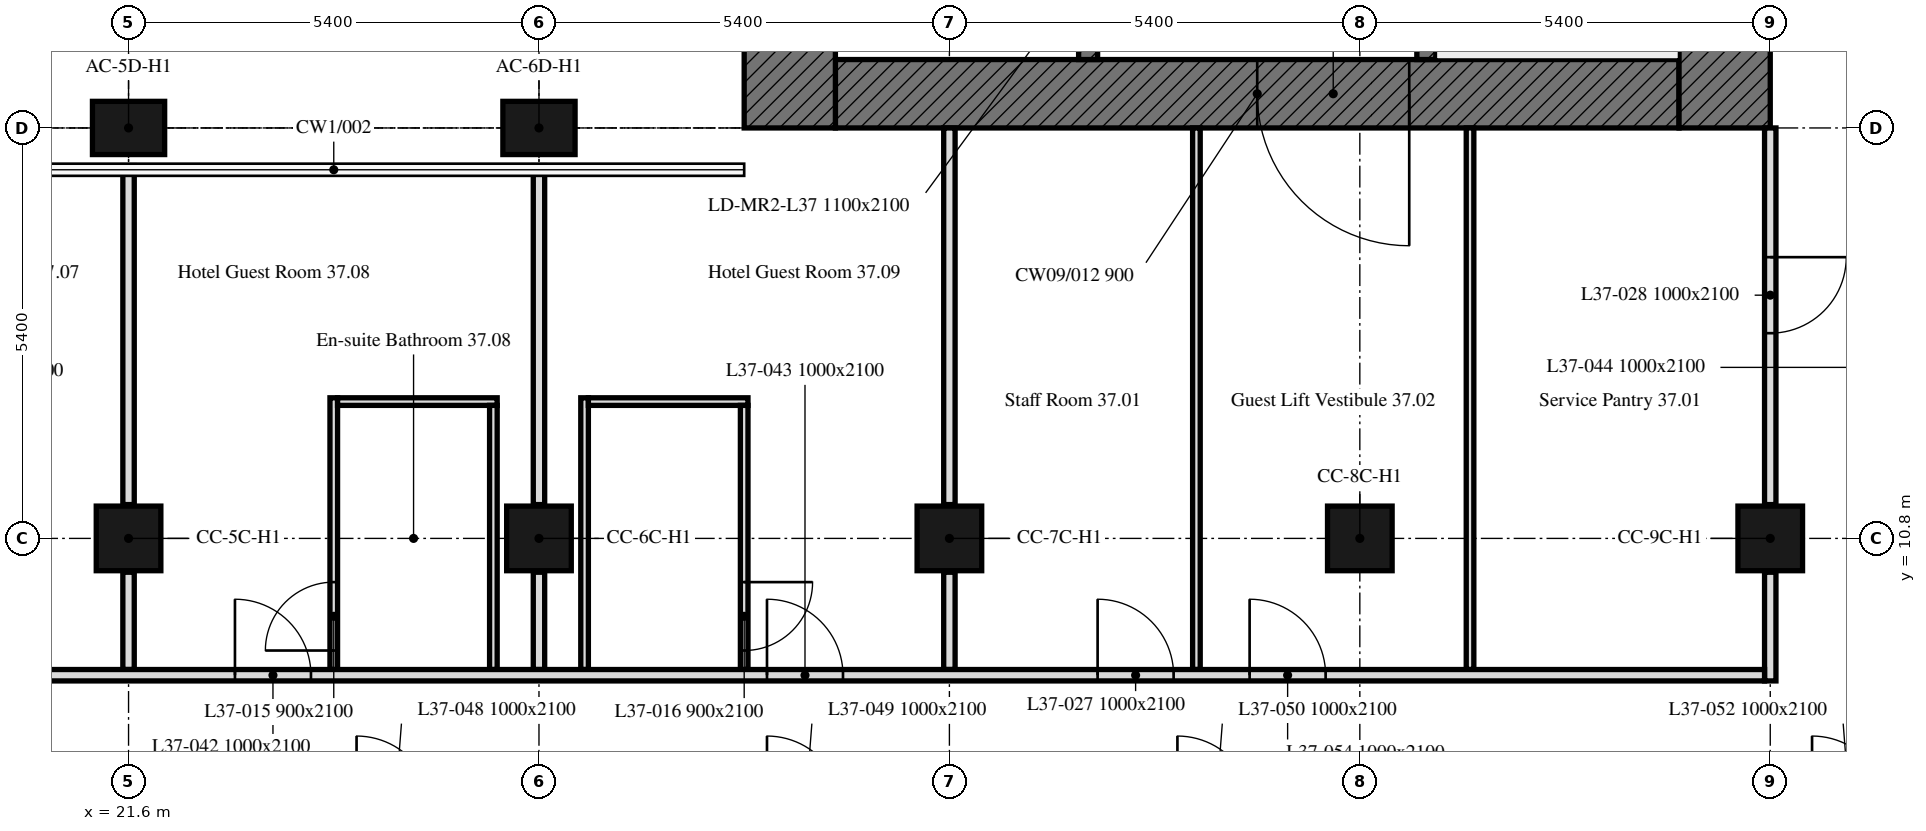
"""IFC4 building model, lengths in metres.
Left out: names, types, materials, properties, quantities, classifications, styles, units other than length and angle.
Written with IfcOpenShell. Run it as: python <this file> out.ifc"""

import sys

from ifc_helpers import new_model, si_unit, direction, frame, frame_2d, origin, origin_2d, place, context, subcontext, project, spatial, rectangle, extrude, element, fill, save


model = new_model("IFC4")
c1 = context("Model", 3, precision=1e-05, world=origin(), true_north=direction((0.0, 1.0)))
c2 = subcontext(c1, "Body", "Model", "MODEL_VIEW")
j1 = project(units=[si_unit("LENGTHUNIT", "METRE"), si_unit("PLANEANGLEUNIT", "RADIAN")], contexts=[c1])
p1 = place(None, origin())
s1 = spatial("IfcSite", under=j1, at=p1, CompositionType="ELEMENT")
p2 = place(p1, origin())
s2 = spatial("IfcBuilding", under=s1, at=p2, CompositionType="ELEMENT")
p3 = place(p2, frame((0.0, 0.0, 159.4)))
s3 = spatial("IfcBuildingStorey", under=s2, at=p3, CompositionType="ELEMENT", Elevation=159.4)
for number, where, z_axis, x_axis in (
    (1, (21.6, 10.8, 0.0), (0.0, 0.0, 1.0), (1.0, 0.0, 0.0)),
    (2, (27.0, 10.8, 0.0), (0.0, 0.0, 1.0), (1.0, 0.0, 0.0)),
    (3, (32.4, 10.8, 0.0), (0.0, 0.0, 1.0), (1.0, 0.0, 0.0)),
    (4, (37.8, 10.8, 0.0), (0.0, 0.0, 1.0), (1.0, 0.0, 0.0)),
    (5, (43.2, 10.8, 0.0), (0.0, 0.0, 1.0), (1.0, 0.0, 0.0)),
):
    element("IfcColumn", number, at=place(p3, frame(where, z_axis=z_axis, x_axis=x_axis)), inside=s3, PredefinedType="COLUMN", context=c2, shape_type="SweptSolid", body=[
        extrude(rectangle(XDim=0.85, YDim=0.85, at=origin_2d()), origin(), (0.0, 0.0, 1.0), 3.0),
    ])
for number, where, z_axis, x_axis in (
    (6, (21.6, 16.2, 0.0), (0.0, 0.0, 1.0), (1.0, 0.0, 0.0)),
    (7, (27.0, 16.2, 0.0), (0.0, 0.0, 1.0), (1.0, 0.0, 0.0)),
):
    element("IfcColumn", number, at=place(p3, frame(where, z_axis=z_axis, x_axis=x_axis)), inside=s3, PredefinedType="COLUMN", context=c2, shape_type="SweptSolid", body=[
        extrude(rectangle(XDim=0.95, YDim=0.7, at=origin_2d()), origin(), (0.0, 0.0, 1.0), 3.0),
    ])
p4 = place(p3, frame((42.0, 16.65, 0.0), z_axis=(0.0, 0.0, 1.0), x_axis=(-1.0, 0.0, 0.0)))
e8 = element("IfcWall", 8, at=p4, inside=s3, PredefinedType="SOLIDWALL", context=c2, shape_type="SweptSolid", body=[
    extrude(rectangle(XDim=11.1, YDim=0.9, at=frame_2d((5.55, 0.0))), origin(), (0.0, 0.0, 1.0), 3.0),
])
p5 = place(p4, frame((3.55, 0.0, 0.0)))
e9 = element("IfcOpeningElement", 9, at=p5, cuts=e8, PredefinedType="OPENING", context=c2, shape_type="SweptSolid", body=[
    extrude(rectangle(XDim=2.0, YDim=2.4, at=frame_2d((1.0, 1.2))), frame((0.0, 0.45, 0.0), z_axis=(0.0, -1.0, 0.0), x_axis=(1.0, 0.0, 0.0)), (0.0, 0.0, 1.0), 0.9),
])
for number, where, z_axis, x_axis in (
    (10, (42.6, 32.4, 0.0), (0.0, 0.0, 1.0), (0.0, -1.0, 0.0)),
    (11, (30.3, 16.2, 0.0), (0.0, 0.0, 1.0), (0.0, 1.0, 0.0)),
):
    element("IfcWall", number, at=place(p3, frame(where, z_axis=z_axis, x_axis=x_axis)), inside=s3, PredefinedType="SOLIDWALL", context=c2, shape_type="SweptSolid", body=[
        extrude(rectangle(XDim=16.2, YDim=1.2, at=frame_2d((8.1, 0.0))), origin(), (0.0, 0.0, 1.0), 3.0),
    ])
p6 = place(p3, frame((38.675, 17.1, 0.0), z_axis=(0.0, 0.0, 1.0), x_axis=(0.0, 1.0, 0.0)))
e12 = element("IfcWall", 12, at=p6, inside=s3, PredefinedType="SOLIDWALL", context=c2, shape_type="SweptSolid", body=[
    extrude(rectangle(XDim=14.4, YDim=0.25, at=frame_2d((7.2, 0.0))), origin(), (0.0, 0.0, 1.0), 3.0),
])
p7 = place(p6, frame((4.6, 0.0, 0.0)))
e13 = element("IfcOpeningElement", 13, at=p7, cuts=e12, PredefinedType="OPENING", context=c2, shape_type="SweptSolid", body=[
    extrude(rectangle(XDim=1.0, YDim=2.1, at=frame_2d((0.5, 1.05))), frame((0.0, 0.125, 0.0), z_axis=(0.0, -1.0, 0.0), x_axis=(1.0, 0.0, 0.0)), (0.0, 0.0, 1.0), 0.25),
])
p8 = place(p6, frame((7.062, 0.0, 0.0)))
e14 = element("IfcOpeningElement", 14, at=p8, cuts=e12, PredefinedType="OPENING", context=c2, shape_type="SweptSolid", body=[
    extrude(rectangle(XDim=1.2, YDim=2.1, at=frame_2d((0.6, 1.05))), frame((0.0, 0.125, 0.0), z_axis=(0.0, -1.0, 0.0), x_axis=(1.0, 0.0, 0.0)), (0.0, 0.0, 1.0), 0.25),
])
p9 = place(p6, frame((9.599, 0.0, 0.0)))
e15 = element("IfcOpeningElement", 15, at=p9, cuts=e12, PredefinedType="OPENING", context=c2, shape_type="SweptSolid", body=[
    extrude(rectangle(XDim=0.9, YDim=2.1, at=frame_2d((0.45, 1.05))), frame((0.0, 0.125, 0.0), z_axis=(0.0, -1.0, 0.0), x_axis=(1.0, 0.0, 0.0)), (0.0, 0.0, 1.0), 0.25),
])
p10 = place(p6, frame((11.032, 0.0, 0.0)))
e16 = element("IfcOpeningElement", 16, at=p10, cuts=e12, PredefinedType="OPENING", context=c2, shape_type="SweptSolid", body=[
    extrude(rectangle(XDim=0.9, YDim=2.1, at=frame_2d((0.45, 1.05))), frame((0.0, 0.125, 0.0), z_axis=(0.0, -1.0, 0.0), x_axis=(1.0, 0.0, 0.0)), (0.0, 0.0, 1.0), 0.25),
])
p11 = place(p6, frame((12.846, 0.0, 0.0)))
e17 = element("IfcOpeningElement", 17, at=p11, cuts=e12, PredefinedType="OPENING", context=c2, shape_type="SweptSolid", body=[
    extrude(rectangle(XDim=0.9, YDim=2.1, at=frame_2d((0.45, 1.05))), frame((0.0, 0.125, 0.0), z_axis=(0.0, -1.0, 0.0), x_axis=(1.0, 0.0, 0.0)), (0.0, 0.0, 1.0), 0.25),
])
p12 = place(p3, frame((34.225, 17.1, 0.0), z_axis=(0.0, 0.0, 1.0), x_axis=(0.0, 1.0, 0.0)))
e18 = element("IfcWall", 18, at=p12, inside=s3, PredefinedType="SOLIDWALL", context=c2, shape_type="SweptSolid", body=[
    extrude(rectangle(XDim=14.4, YDim=0.25, at=frame_2d((7.2, 0.0))), origin(), (0.0, 0.0, 1.0), 3.0),
])
p13 = place(p12, frame((13.15, 0.0, 0.0)))
e19 = element("IfcOpeningElement", 19, at=p13, cuts=e18, PredefinedType="OPENING", context=c2, shape_type="SweptSolid", body=[
    extrude(rectangle(XDim=1.0, YDim=2.1, at=frame_2d((0.5, 1.05))), frame((0.0, 0.125, 0.0), z_axis=(0.0, -1.0, 0.0), x_axis=(1.0, 0.0, 0.0)), (0.0, 0.0, 1.0), 0.25),
])
p14 = place(p12, frame((0.6, 0.0, 0.0)))
e20 = element("IfcOpeningElement", 20, at=p14, cuts=e18, PredefinedType="OPENING", context=c2, shape_type="SweptSolid", body=[
    extrude(rectangle(XDim=1.1, YDim=2.1, at=frame_2d((0.55, 1.05))), frame((0.0, 0.125, 0.0), z_axis=(0.0, -1.0, 0.0), x_axis=(1.0, 0.0, 0.0)), (0.0, 0.0, 1.0), 0.25),
])
p15 = place(p12, frame((3.25, 0.0, 0.0)))
e21 = element("IfcOpeningElement", 21, at=p15, cuts=e18, PredefinedType="OPENING", context=c2, shape_type="SweptSolid", body=[
    extrude(rectangle(XDim=0.9, YDim=2.1, at=frame_2d((0.45, 1.05))), frame((0.0, 0.125, 0.0), z_axis=(0.0, -1.0, 0.0), x_axis=(1.0, 0.0, 0.0)), (0.0, 0.0, 1.0), 0.25),
])
p16 = place(p3, frame((21.6, 9.075, 0.0), z_axis=(0.0, 0.0, 1.0), x_axis=(0.0, 1.0, 0.0)))
e22 = element("IfcWall", 22, at=p16, inside=s3, PredefinedType="PARTITIONING", context=c2, shape_type="SweptSolid", body=[
    extrude(rectangle(XDim=1.28, YDim=0.15, at=frame_2d((0.64, 0.0))), origin(), (0.0, 0.0, 1.0), 2.4),
])
p17 = place(p3, frame((21.6, 11.245, 0.0), z_axis=(0.0, 0.0, 1.0), x_axis=(0.0, 1.0, 0.0)))
e23 = element("IfcWall", 23, at=p17, inside=s3, PredefinedType="PARTITIONING", context=c2, shape_type="SweptSolid", body=[
    extrude(rectangle(XDim=4.46, YDim=0.15, at=frame_2d((2.23, 0.0))), origin(), (0.0, 0.0, 1.0), 2.4),
])
p18 = place(p3, frame((24.3, 9.075, 0.0), z_axis=(0.0, 0.0, 1.0), x_axis=(0.0, 1.0, 0.0)))
e24 = element("IfcWall", 24, at=p18, inside=s3, PredefinedType="PARTITIONING", context=c2, shape_type="SweptSolid", body=[
    extrude(rectangle(XDim=3.575, YDim=0.1, at=frame_2d((1.788, 0.0))), origin(), (0.0, 0.0, 1.0), 3.0),
])
p19 = place(p18, frame((0.25, 0.0, 0.0)))
e25 = element("IfcOpeningElement", 25, at=p19, cuts=e24, PredefinedType="OPENING", context=c2, shape_type="SweptSolid", body=[
    extrude(rectangle(XDim=0.9, YDim=2.1, at=frame_2d((0.45, 1.05))), frame((0.0, 0.05, 0.0), z_axis=(0.0, -1.0, 0.0), x_axis=(1.0, 0.0, 0.0)), (0.0, 0.0, 1.0), 0.1),
])
p20 = place(p3, frame((24.35, 12.6, 0.0), z_axis=(0.0, 0.0, 1.0), x_axis=(1.0, 0.0, 0.0)))
e26 = element("IfcWall", 26, at=p20, inside=s3, PredefinedType="PARTITIONING", context=c2, shape_type="SweptSolid", body=[
    extrude(rectangle(XDim=2.1, YDim=0.1, at=frame_2d((1.05, 0.0))), origin(), (0.0, 0.0, 1.0), 3.0),
])
p21 = place(p3, frame((26.4, 12.55, 0.0), z_axis=(0.0, 0.0, 1.0), x_axis=(0.0, -1.0, 0.0)))
e27 = element("IfcWall", 27, at=p21, inside=s3, PredefinedType="PARTITIONING", context=c2, shape_type="SweptSolid", body=[
    extrude(rectangle(XDim=3.475, YDim=0.1, at=frame_2d((1.738, 0.0))), origin(), (0.0, 0.0, 1.0), 3.0),
])
p22 = place(p3, frame((27.0, 9.075, 0.0), z_axis=(0.0, 0.0, 1.0), x_axis=(0.0, 1.0, 0.0)))
e28 = element("IfcWall", 28, at=p22, inside=s3, PredefinedType="PARTITIONING", context=c2, shape_type="SweptSolid", body=[
    extrude(rectangle(XDim=1.28, YDim=0.15, at=frame_2d((0.64, 0.0))), origin(), (0.0, 0.0, 1.0), 2.4),
])
p23 = place(p3, frame((27.0, 11.245, 0.0), z_axis=(0.0, 0.0, 1.0), x_axis=(0.0, 1.0, 0.0)))
e29 = element("IfcWall", 29, at=p23, inside=s3, PredefinedType="PARTITIONING", context=c2, shape_type="SweptSolid", body=[
    extrude(rectangle(XDim=4.46, YDim=0.15, at=frame_2d((2.23, 0.0))), origin(), (0.0, 0.0, 1.0), 2.4),
])
p24 = place(p3, frame((27.6, 9.075, 0.0), z_axis=(0.0, 0.0, 1.0), x_axis=(0.0, 1.0, 0.0)))
e30 = element("IfcWall", 30, at=p24, inside=s3, PredefinedType="PARTITIONING", context=c2, shape_type="SweptSolid", body=[
    extrude(rectangle(XDim=3.575, YDim=0.1, at=frame_2d((1.788, 0.0))), origin(), (0.0, 0.0, 1.0), 3.0),
])
p25 = place(p3, frame((27.65, 12.6, 0.0), z_axis=(0.0, 0.0, 1.0), x_axis=(1.0, 0.0, 0.0)))
e31 = element("IfcWall", 31, at=p25, inside=s3, PredefinedType="PARTITIONING", context=c2, shape_type="SweptSolid", body=[
    extrude(rectangle(XDim=2.1, YDim=0.1, at=frame_2d((1.05, 0.0))), origin(), (0.0, 0.0, 1.0), 3.0),
])
p26 = place(p3, frame((29.7, 12.55, 0.0), z_axis=(0.0, 0.0, 1.0), x_axis=(0.0, -1.0, 0.0)))
e32 = element("IfcWall", 32, at=p26, inside=s3, PredefinedType="PARTITIONING", context=c2, shape_type="SweptSolid", body=[
    extrude(rectangle(XDim=3.475, YDim=0.1, at=frame_2d((1.738, 0.0))), origin(), (0.0, 0.0, 1.0), 3.0),
])
p27 = place(p26, frame((2.325, 0.0, 0.0)))
e33 = element("IfcOpeningElement", 33, at=p27, cuts=e32, PredefinedType="OPENING", context=c2, shape_type="SweptSolid", body=[
    extrude(rectangle(XDim=0.9, YDim=2.1, at=frame_2d((0.45, 1.05))), frame((0.0, 0.05, 0.0), z_axis=(0.0, -1.0, 0.0), x_axis=(1.0, 0.0, 0.0)), (0.0, 0.0, 1.0), 0.1),
])
p28 = place(p3, frame((32.4, 9.075, 0.0), z_axis=(0.0, 0.0, 1.0), x_axis=(0.0, 1.0, 0.0)))
e34 = element("IfcWall", 34, at=p28, inside=s3, PredefinedType="PARTITIONING", context=c2, shape_type="SweptSolid", body=[
    extrude(rectangle(XDim=1.28, YDim=0.15, at=frame_2d((0.64, 0.0))), origin(), (0.0, 0.0, 1.0), 2.4),
])
p29 = place(p3, frame((32.4, 11.245, 0.0), z_axis=(0.0, 0.0, 1.0), x_axis=(0.0, 1.0, 0.0)))
e35 = element("IfcWall", 35, at=p29, inside=s3, PredefinedType="PARTITIONING", context=c2, shape_type="SweptSolid", body=[
    extrude(rectangle(XDim=4.955, YDim=0.15, at=frame_2d((2.478, 0.0))), origin(), (0.0, 0.0, 1.0), 2.4),
])
for number, where, z_axis, x_axis in (
    (36, (35.65, 16.2, 0.0), (0.0, 0.0, 1.0), (0.0, -1.0, 0.0)),
    (37, (39.25, 9.075, 0.0), (0.0, 0.0, 1.0), (0.0, 1.0, 0.0)),
):
    element("IfcWall", number, at=place(p3, frame(where, z_axis=z_axis, x_axis=x_axis)), inside=s3, PredefinedType="PARTITIONING", context=c2, shape_type="SweptSolid", body=[
        extrude(rectangle(XDim=7.125, YDim=0.1, at=frame_2d((3.562, 0.0))), origin(), (0.0, 0.0, 1.0), 2.4),
    ])
p30 = place(p3, frame((43.2, 16.2, 0.0), z_axis=(0.0, 0.0, 1.0), x_axis=(0.0, -1.0, 0.0)))
e38 = element("IfcWall", 38, at=p30, inside=s3, PredefinedType="PARTITIONING", context=c2, shape_type="SweptSolid", body=[
    extrude(rectangle(XDim=4.955, YDim=0.15, at=frame_2d((2.478, 0.0))), origin(), (0.0, 0.0, 1.0), 3.0),
])
p31 = place(p30, frame((1.7, 0.0, 0.0)))
e39 = element("IfcOpeningElement", 39, at=p31, cuts=e38, PredefinedType="OPENING", context=c2, shape_type="SweptSolid", body=[
    extrude(rectangle(XDim=1.0, YDim=2.1, at=frame_2d((0.5, 1.05))), frame((0.0, 0.075, 0.0), z_axis=(0.0, -1.0, 0.0), x_axis=(1.0, 0.0, 0.0)), (0.0, 0.0, 1.0), 0.15),
])
p32 = place(p3, frame((43.2, 10.355, 0.0), z_axis=(0.0, 0.0, 1.0), x_axis=(0.0, -1.0, 0.0)))
e40 = element("IfcWall", 40, at=p32, inside=s3, PredefinedType="PARTITIONING", context=c2, shape_type="SweptSolid", body=[
    extrude(rectangle(XDim=1.43, YDim=0.15, at=frame_2d((0.715, 0.0))), origin(), (0.0, 0.0, 1.0), 3.0),
])
p33 = place(p3, frame((6.151, 9.0, 0.0), z_axis=(0.0, 0.0, 1.0), x_axis=(1.0, 0.0, 0.0)))
e41 = element("IfcWall", 41, at=p33, inside=s3, PredefinedType="PARTITIONING", context=c2, shape_type="SweptSolid", body=[
    extrude(rectangle(XDim=36.974, YDim=0.15, at=frame_2d((18.487, 0.0))), origin(), (0.0, 0.0, 1.0), 2.4),
])
p34 = place(p33, frame((1.214, 0.0, 0.0)))
e42 = element("IfcOpeningElement", 42, at=p34, cuts=e41, PredefinedType="OPENING", context=c2, shape_type="SweptSolid", body=[
    extrude(rectangle(XDim=1.0, YDim=2.1, at=frame_2d((0.5, 1.05))), frame((0.0, 0.075, 0.0), z_axis=(0.0, -1.0, 0.0), x_axis=(1.0, 0.0, 0.0)), (0.0, 0.0, 1.0), 0.15),
])
p35 = place(p33, frame((28.199, 0.0, 0.0)))
e43 = element("IfcOpeningElement", 43, at=p35, cuts=e41, PredefinedType="OPENING", context=c2, shape_type="SweptSolid", body=[
    extrude(rectangle(XDim=1.0, YDim=2.1, at=frame_2d((0.5, 1.05))), frame((0.0, 0.075, 0.0), z_axis=(0.0, -1.0, 0.0), x_axis=(1.0, 0.0, 0.0)), (0.0, 0.0, 1.0), 0.15),
])
p36 = place(p33, frame((7.099, 0.0, 0.0)))
e44 = element("IfcOpeningElement", 44, at=p36, cuts=e41, PredefinedType="OPENING", context=c2, shape_type="SweptSolid", body=[
    extrude(rectangle(XDim=1.0, YDim=2.1, at=frame_2d((0.5, 1.05))), frame((0.0, 0.075, 0.0), z_axis=(0.0, -1.0, 0.0), x_axis=(1.0, 0.0, 0.0)), (0.0, 0.0, 1.0), 0.15),
])
p37 = place(p33, frame((13.049, 0.0, 0.0)))
e45 = element("IfcOpeningElement", 45, at=p37, cuts=e41, PredefinedType="OPENING", context=c2, shape_type="SweptSolid", body=[
    extrude(rectangle(XDim=1.0, YDim=2.1, at=frame_2d((0.5, 1.05))), frame((0.0, 0.075, 0.0), z_axis=(0.0, -1.0, 0.0), x_axis=(1.0, 0.0, 0.0)), (0.0, 0.0, 1.0), 0.15),
])
p38 = place(p33, frame((16.849, 0.0, 0.0)))
e46 = element("IfcOpeningElement", 46, at=p38, cuts=e41, PredefinedType="OPENING", context=c2, shape_type="SweptSolid", body=[
    extrude(rectangle(XDim=1.0, YDim=2.1, at=frame_2d((0.5, 1.05))), frame((0.0, 0.075, 0.0), z_axis=(0.0, -1.0, 0.0), x_axis=(1.0, 0.0, 0.0)), (0.0, 0.0, 1.0), 0.15),
])
p39 = place(p33, frame((23.849, 0.0, 0.0)))
e47 = element("IfcOpeningElement", 47, at=p39, cuts=e41, PredefinedType="OPENING", context=c2, shape_type="SweptSolid", body=[
    extrude(rectangle(XDim=1.0, YDim=2.1, at=frame_2d((0.5, 1.05))), frame((0.0, 0.075, 0.0), z_axis=(0.0, -1.0, 0.0), x_axis=(1.0, 0.0, 0.0)), (0.0, 0.0, 1.0), 0.15),
])
p40 = place(p33, frame((4.829, 0.0, 0.0)))
e48 = element("IfcOpeningElement", 48, at=p40, cuts=e41, PredefinedType="OPENING", context=c2, shape_type="SweptSolid", body=[
    extrude(rectangle(XDim=1.8, YDim=2.4, at=frame_2d((0.9, 1.2))), frame((0.0, 0.075, 0.0), z_axis=(0.0, -1.0, 0.0), x_axis=(1.0, 0.0, 0.0)), (0.0, 0.0, 1.0), 0.15),
])
p41 = place(p33, frame((30.199, 0.0, 0.0)))
e49 = element("IfcOpeningElement", 49, at=p41, cuts=e41, PredefinedType="OPENING", context=c2, shape_type="SweptSolid", body=[
    extrude(rectangle(XDim=1.0, YDim=2.1, at=frame_2d((0.5, 1.05))), frame((0.0, 0.075, 0.0), z_axis=(0.0, -1.0, 0.0), x_axis=(1.0, 0.0, 0.0)), (0.0, 0.0, 1.0), 0.15),
])
p42 = place(p5, origin())
e50 = element("IfcDoor", 50, at=p42, inside=s3, OperationType="DOUBLE_DOOR_SINGLE_SWING", PredefinedType="DOOR", context=c2, shape_type="SweptSolid", body=[
    extrude(rectangle(XDim=2.0, YDim=2.4, at=frame_2d((1.0, 1.2))), frame((0.0, 0.025, 0.0), z_axis=(0.0, -1.0, 0.0), x_axis=(1.0, 0.0, 0.0)), (0.0, 0.0, 1.0), 0.05),
])
fill(e9, e50)
p43 = place(p19, origin())
e51 = element("IfcDoor", 51, at=p43, inside=s3, OperationType="SINGLE_SWING_LEFT", PredefinedType="DOOR", context=c2, shape_type="SweptSolid", body=[
    extrude(rectangle(XDim=0.9, YDim=2.1, at=frame_2d((0.45, 1.05))), frame((0.0, 0.025, 0.0), z_axis=(0.0, -1.0, 0.0), x_axis=(1.0, 0.0, 0.0)), (0.0, 0.0, 1.0), 0.05),
])
fill(e25, e51)
p44 = place(p27, origin())
e52 = element("IfcDoor", 52, at=p44, inside=s3, OperationType="SINGLE_SWING_RIGHT", PredefinedType="DOOR", context=c2, shape_type="SweptSolid", body=[
    extrude(rectangle(XDim=0.9, YDim=2.1, at=frame_2d((0.45, 1.05))), frame((0.0, 0.025, 0.0), z_axis=(0.0, -1.0, 0.0), x_axis=(1.0, 0.0, 0.0)), (0.0, 0.0, 1.0), 0.05),
])
fill(e33, e52)
p45 = place(p35, origin())
e53 = element("IfcDoor", 53, at=p45, inside=s3, OperationType="SINGLE_SWING_LEFT", PredefinedType="DOOR", context=c2, shape_type="SweptSolid", body=[
    extrude(rectangle(XDim=1.0, YDim=2.1, at=frame_2d((0.5, 1.05))), frame((0.0, 0.025, 0.0), z_axis=(0.0, -1.0, 0.0), x_axis=(1.0, 0.0, 0.0)), (0.0, 0.0, 1.0), 0.05),
])
fill(e43, e53)
p46 = place(p31, origin())
e54 = element("IfcDoor", 54, at=p46, inside=s3, OperationType="SINGLE_SWING_RIGHT", PredefinedType="DOOR", context=c2, shape_type="SweptSolid", body=[
    extrude(rectangle(XDim=1.0, YDim=2.1, at=frame_2d((0.5, 1.05))), frame((0.0, 0.025, 0.0), z_axis=(0.0, -1.0, 0.0), x_axis=(1.0, 0.0, 0.0)), (0.0, 0.0, 1.0), 0.05),
])
fill(e39, e54)
p47 = place(p38, origin())
e55 = element("IfcDoor", 55, at=p47, inside=s3, OperationType="SINGLE_SWING_LEFT", PredefinedType="DOOR", context=c2, shape_type="SweptSolid", body=[
    extrude(rectangle(XDim=1.0, YDim=2.1, at=frame_2d((0.5, 1.05))), frame((0.0, 0.025, 0.0), z_axis=(0.0, -1.0, 0.0), x_axis=(1.0, 0.0, 0.0)), (0.0, 0.0, 1.0), 0.05),
])
fill(e46, e55)
p48 = place(p39, origin())
e56 = element("IfcDoor", 56, at=p48, inside=s3, OperationType="SINGLE_SWING_RIGHT", PredefinedType="DOOR", context=c2, shape_type="SweptSolid", body=[
    extrude(rectangle(XDim=1.0, YDim=2.1, at=frame_2d((0.5, 1.05))), frame((0.0, 0.025, 0.0), z_axis=(0.0, -1.0, 0.0), x_axis=(1.0, 0.0, 0.0)), (0.0, 0.0, 1.0), 0.05),
])
fill(e47, e56)
p49 = place(p41, origin())
e57 = element("IfcDoor", 57, at=p49, inside=s3, OperationType="SINGLE_SWING_LEFT", PredefinedType="DOOR", context=c2, shape_type="SweptSolid", body=[
    extrude(rectangle(XDim=1.0, YDim=2.1, at=frame_2d((0.5, 1.05))), frame((0.0, 0.025, 0.0), z_axis=(0.0, -1.0, 0.0), x_axis=(1.0, 0.0, 0.0)), (0.0, 0.0, 1.0), 0.05),
])
fill(e49, e57)
save(model, sys.argv[1])
